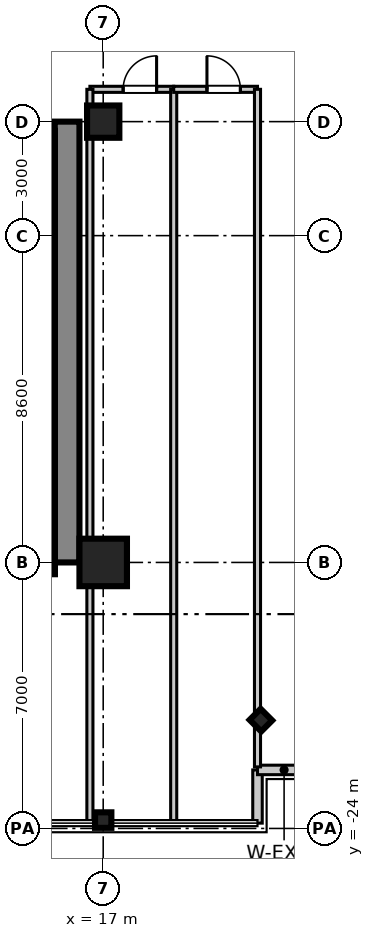
"""IFC4 building model, lengths in metres.
Left out: names, types, materials, properties, quantities, classifications, styles, units other than length and angle.
Written with IfcOpenShell. Run it as: python <this file> out.ifc"""

import sys

from ifc_helpers import new_model, si_unit, direction, frame, frame_2d, origin, origin_2d, place, context, subcontext, project, spatial, rectangle, i_section, extrude, source, transform, mapped, element, fill, save


model = new_model("IFC4")
c1 = context("Model", 3, precision=1e-05, world=origin(), true_north=direction((0.0, 1.0)))
c2 = subcontext(c1, "Body", "Model", "MODEL_VIEW")
j1 = project(units=[si_unit("LENGTHUNIT", "METRE"), si_unit("PLANEANGLEUNIT", "RADIAN")], contexts=[c1])
p1 = place(None, origin())
s1 = spatial("IfcSite", under=j1, at=p1, CompositionType="ELEMENT")
p2 = place(p1, origin())
s2 = spatial("IfcBuilding", under=s1, at=p2, CompositionType="ELEMENT")
p3 = place(p2, frame((0.0, 0.0, 117.5)))
s3 = spatial("IfcBuildingStorey", under=s2, at=p3, CompositionType="ELEMENT", Elevation=117.5)
m1 = source(origin(), c2, "Body", "SweptSolid", [
    extrude(rectangle(XDim=1.25, YDim=1.25, at=origin_2d()), origin(), (0.0, 0.0, 1.0), 3.605),
])
p4 = place(p3, frame((17.0, -17.0, 0.0), z_axis=(0.0, 0.0, 1.0), x_axis=(1.0, 0.0, 0.0)))
e1 = element("IfcColumn", 1, at=p4, inside=s3, PredefinedType="COLUMN", context=c2, shape_type="MappedRepresentation", body=[
    mapped(m1, transform((0.0, 0.0, 0.0), scale=1.0)),
])
m2 = source(origin(), c2, "Body", "SweptSolid", [
    extrude(rectangle(XDim=0.85, YDim=0.85, at=origin_2d()), origin(), (0.0, 0.0, 1.0), 3.605),
])
p5 = place(p3, frame((17.0, -5.4, 0.0), z_axis=(0.0, 0.0, 1.0), x_axis=(1.0, 0.0, 0.0)))
e2 = element("IfcColumn", 2, at=p5, inside=s3, PredefinedType="PILASTER", context=c2, shape_type="MappedRepresentation", body=[
    mapped(m2, transform((0.0, 0.0, 0.0), scale=1.0)),
])
m3 = source(origin(), c2, "Body", "SweptSolid", [
    extrude(i_section(OverallWidth=0.409, OverallDepth=0.43, WebThickness=0.021, FlangeThickness=0.034, at=origin_2d()), origin(), (0.0, 0.0, 1.0), 3.605),
])
for number, where, z_axis, x_axis in (
    (3, (17.0, -23.78, 0.0), (0.0, 0.0, 1.0), (0.0, 1.0, 0.0)),
    (4, (21.15, -21.15, 0.0), (0.0, 0.0, 1.0), (0.707, 0.707, 0.0)),
):
    element("IfcColumn", number, at=place(p3, frame(where, z_axis=z_axis, x_axis=x_axis)), inside=s3, PredefinedType="COLUMN", context=c2, shape_type="MappedRepresentation", body=[
        mapped(m3, transform((0.0, 0.0, 0.0), scale=1.0)),
    ])
m4 = source(origin(), c2, "Body", "SweptSolid", [
    extrude(rectangle(XDim=11.6, YDim=0.65, at=frame_2d((5.8, 0.0))), origin(), (0.0, 0.0, 1.0), 3.38),
])
p6 = place(p3, frame((16.05, -17.0, 0.0), z_axis=(0.0, 0.0, 1.0), x_axis=(0.0, 1.0, 0.0)))
e5 = element("IfcWall", 5, at=p6, inside=s3, PredefinedType="SHEAR", context=c2, shape_type="MappedRepresentation", body=[
    mapped(m4, transform((0.0, 0.0, 0.0), scale=1.0)),
])
m5 = source(origin(), c2, "Body", "SweptSolid", [
    extrude(rectangle(XDim=2.36, YDim=0.22, at=frame_2d((1.18, 0.0))), origin(), (0.0, 0.0, 1.0), 3.38),
])
p7 = place(p3, frame((15.62, -8.0, 0.0), z_axis=(0.0, 0.0, 1.0), x_axis=(0.0, 1.0, 0.0)))
e6 = element("IfcWall", 6, at=p7, inside=s3, PredefinedType="SHEAR", context=c2, shape_type="MappedRepresentation", body=[
    mapped(m5, transform((0.0, 0.0, 0.0), scale=1.0)),
])
m6 = source(origin(), c2, "Body", "SweptSolid", [
    extrude(rectangle(XDim=2.2, YDim=0.22, at=frame_2d((1.1, 0.0))), origin(), (0.0, 0.0, 1.0), 3.38),
])
for number, where, z_axis, x_axis in (
    (7, (15.62, -10.2, 0.0), (0.0, 0.0, 1.0), (0.0, 1.0, 0.0)),
    (8, (15.62, -12.4, 0.0), (0.0, 0.0, 1.0), (0.0, 1.0, 0.0)),
):
    element("IfcWall", number, at=place(p3, frame(where, z_axis=z_axis, x_axis=x_axis)), inside=s3, PredefinedType="SHEAR", context=c2, shape_type="MappedRepresentation", body=[
        mapped(m6, transform((0.0, 0.0, 0.0), scale=1.0)),
    ])
m7 = source(origin(), c2, "Body", "SweptSolid", [
    extrude(rectangle(XDim=2.3, YDim=0.22, at=frame_2d((1.15, 0.0))), origin(), (0.0, 0.0, 1.0), 3.38),
])
p8 = place(p3, frame((15.62, -14.7, 0.0), z_axis=(0.0, 0.0, 1.0), x_axis=(0.0, 1.0, 0.0)))
e9 = element("IfcWall", 9, at=p8, inside=s3, PredefinedType="SHEAR", context=c2, shape_type="MappedRepresentation", body=[
    mapped(m7, transform((0.0, 0.0, 0.0), scale=1.0)),
])
m8 = source(origin(), c2, "Body", "SweptSolid", [
    extrude(rectangle(XDim=2.61, YDim=0.22, at=frame_2d((1.305, 0.0))), origin(), (0.0, 0.0, 1.0), 3.38),
])
p9 = place(p3, frame((15.62, -17.31, 0.0), z_axis=(0.0, 0.0, 1.0), x_axis=(0.0, 1.0, 0.0)))
e10 = element("IfcWall", 10, at=p9, inside=s3, PredefinedType="SHEAR", context=c2, shape_type="MappedRepresentation", body=[
    mapped(m8, transform((0.0, 0.0, 0.0), scale=1.0)),
])
m9 = source(origin(), c2, "Body", "SweptSolid", [
    extrude(rectangle(XDim=1.4, YDim=0.25, at=frame_2d((0.7, 0.0))), origin(), (0.0, 0.0, 1.0), 3.38),
])
p10 = place(p3, frame((21.06, -23.86, 0.0), z_axis=(0.0, 0.0, 1.0), x_axis=(0.0, 1.0, 0.0)))
e11 = element("IfcWall", 11, at=p10, inside=s3, PredefinedType="STANDARD", context=c2, shape_type="MappedRepresentation", body=[
    mapped(m9, transform((0.0, 0.0, 0.0), scale=1.0)),
])
m10 = source(origin(), c2, "Body", "SweptSolid", [
    extrude(rectangle(XDim=1.4, YDim=0.25, at=frame_2d((0.7, 0.0))), origin(), (0.0, 0.0, 1.0), 3.38),
])
p11 = place(p3, frame((21.06, -22.46, 0.0), z_axis=(0.0, 0.0, 1.0), x_axis=(1.0, 0.0, 0.0)))
e12 = element("IfcWall", 12, at=p11, inside=s3, PredefinedType="STANDARD", context=c2, shape_type="MappedRepresentation", body=[
    mapped(m10, transform((0.0, 0.0, 0.0), scale=1.0)),
])
m11 = source(origin(), c2, "Body", "SweptSolid", [
    extrude(rectangle(XDim=2.205, YDim=0.16, at=frame_2d((1.103, 0.0))), origin(), (0.0, 0.0, 1.0), 2.72),
])
p12 = place(p3, frame((16.65, -4.55, 0.0), z_axis=(0.0, 0.0, 1.0), x_axis=(1.0, 0.0, 0.0)))
e13 = element("IfcWall", 13, at=p12, inside=s3, PredefinedType="PARTITIONING", context=c2, shape_type="MappedRepresentation", body=[
    mapped(m11, transform((0.0, 0.0, 0.0), scale=1.0)),
])
p13 = place(p12, frame((0.875, 0.0, 0.0)))
e14 = element("IfcOpeningElement", 14, at=p13, cuts=e13, PredefinedType="OPENING", context=c2, shape_type="SweptSolid", body=[
    extrude(rectangle(XDim=0.88, YDim=2.1, at=frame_2d((0.44, 1.05))), frame((0.0, 0.09, 0.0), z_axis=(0.0, -1.0, 0.0), x_axis=(1.0, 0.0, 0.0)), (0.0, 0.0, 1.0), 0.18),
])
m12 = source(origin(), c2, "Body", "SweptSolid", [
    extrude(rectangle(XDim=19.25, YDim=0.16, at=frame_2d((9.625, 0.0))), origin(), (0.0, 0.0, 1.0), 2.72),
])
for number, where, z_axis, x_axis in (
    (15, (16.65, -23.8, 0.0), (0.0, 0.0, 1.0), (0.0, 1.0, 0.0)),
    (16, (18.855, -23.8, 0.0), (0.0, 0.0, 1.0), (0.0, 1.0, 0.0)),
):
    element("IfcWall", number, at=place(p3, frame(where, z_axis=z_axis, x_axis=x_axis)), inside=s3, PredefinedType="PARTITIONING", context=c2, shape_type="MappedRepresentation", body=[
        mapped(m12, transform((0.0, 0.0, 0.0), scale=1.0)),
    ])
p14 = place(p3, frame((18.855, -4.55, 0.0), z_axis=(0.0, 0.0, 1.0), x_axis=(1.0, 0.0, 0.0)))
e17 = element("IfcWall", 17, at=p14, inside=s3, PredefinedType="PARTITIONING", context=c2, shape_type="MappedRepresentation", body=[
    mapped(m11, transform((0.0, 0.0, 0.0), scale=1.0)),
])
p15 = place(p14, frame((0.875, 0.0, 0.0)))
e18 = element("IfcOpeningElement", 18, at=p15, cuts=e17, PredefinedType="OPENING", context=c2, shape_type="SweptSolid", body=[
    extrude(rectangle(XDim=0.88, YDim=2.1, at=frame_2d((0.44, 1.05))), frame((0.0, 0.09, 0.0), z_axis=(0.0, -1.0, 0.0), x_axis=(1.0, 0.0, 0.0)), (0.0, 0.0, 1.0), 0.18),
])
m13 = source(origin(), c2, "Body", "SweptSolid", [
    extrude(rectangle(XDim=17.83, YDim=0.16, at=frame_2d((8.915, 0.0))), origin(), (0.0, 0.0, 1.0), 2.72),
])
p16 = place(p3, frame((21.06, -22.38, 0.0), z_axis=(0.0, 0.0, 1.0), x_axis=(0.0, 1.0, 0.0)))
e19 = element("IfcWall", 19, at=p16, inside=s3, PredefinedType="PARTITIONING", context=c2, shape_type="MappedRepresentation", body=[
    mapped(m13, transform((0.0, 0.0, 0.0), scale=1.0)),
])
m14 = source(origin(), c2, "Body", "SweptSolid", [
    extrude(rectangle(XDim=0.88, YDim=2.1, at=frame_2d((0.44, 1.05))), frame((0.0, 0.025, 0.0), z_axis=(0.0, -1.0, 0.0), x_axis=(1.0, 0.0, 0.0)), (0.0, 0.0, 1.0), 0.05),
])
p17 = place(p13, frame((0.88, 0.0, 0.0), z_axis=(0.0, 0.0, 1.0), x_axis=(-1.0, 0.0, 0.0)))
e20 = element("IfcDoor", 20, at=p17, inside=s3, OperationType="SINGLE_SWING_RIGHT", PredefinedType="DOOR", context=c2, shape_type="MappedRepresentation", body=[
    mapped(m14, transform((0.0, 0.0, 0.0), scale=1.0)),
])
fill(e14, e20)
p18 = place(p15, frame((0.88, 0.0, 0.0), z_axis=(0.0, 0.0, 1.0), x_axis=(-1.0, 0.0, 0.0)))
e21 = element("IfcDoor", 21, at=p18, inside=s3, OperationType="SINGLE_SWING_LEFT", PredefinedType="DOOR", context=c2, shape_type="MappedRepresentation", body=[
    mapped(m14, transform((0.0, 0.0, 0.0), scale=1.0)),
])
fill(e18, e21)
save(model, sys.argv[1])
